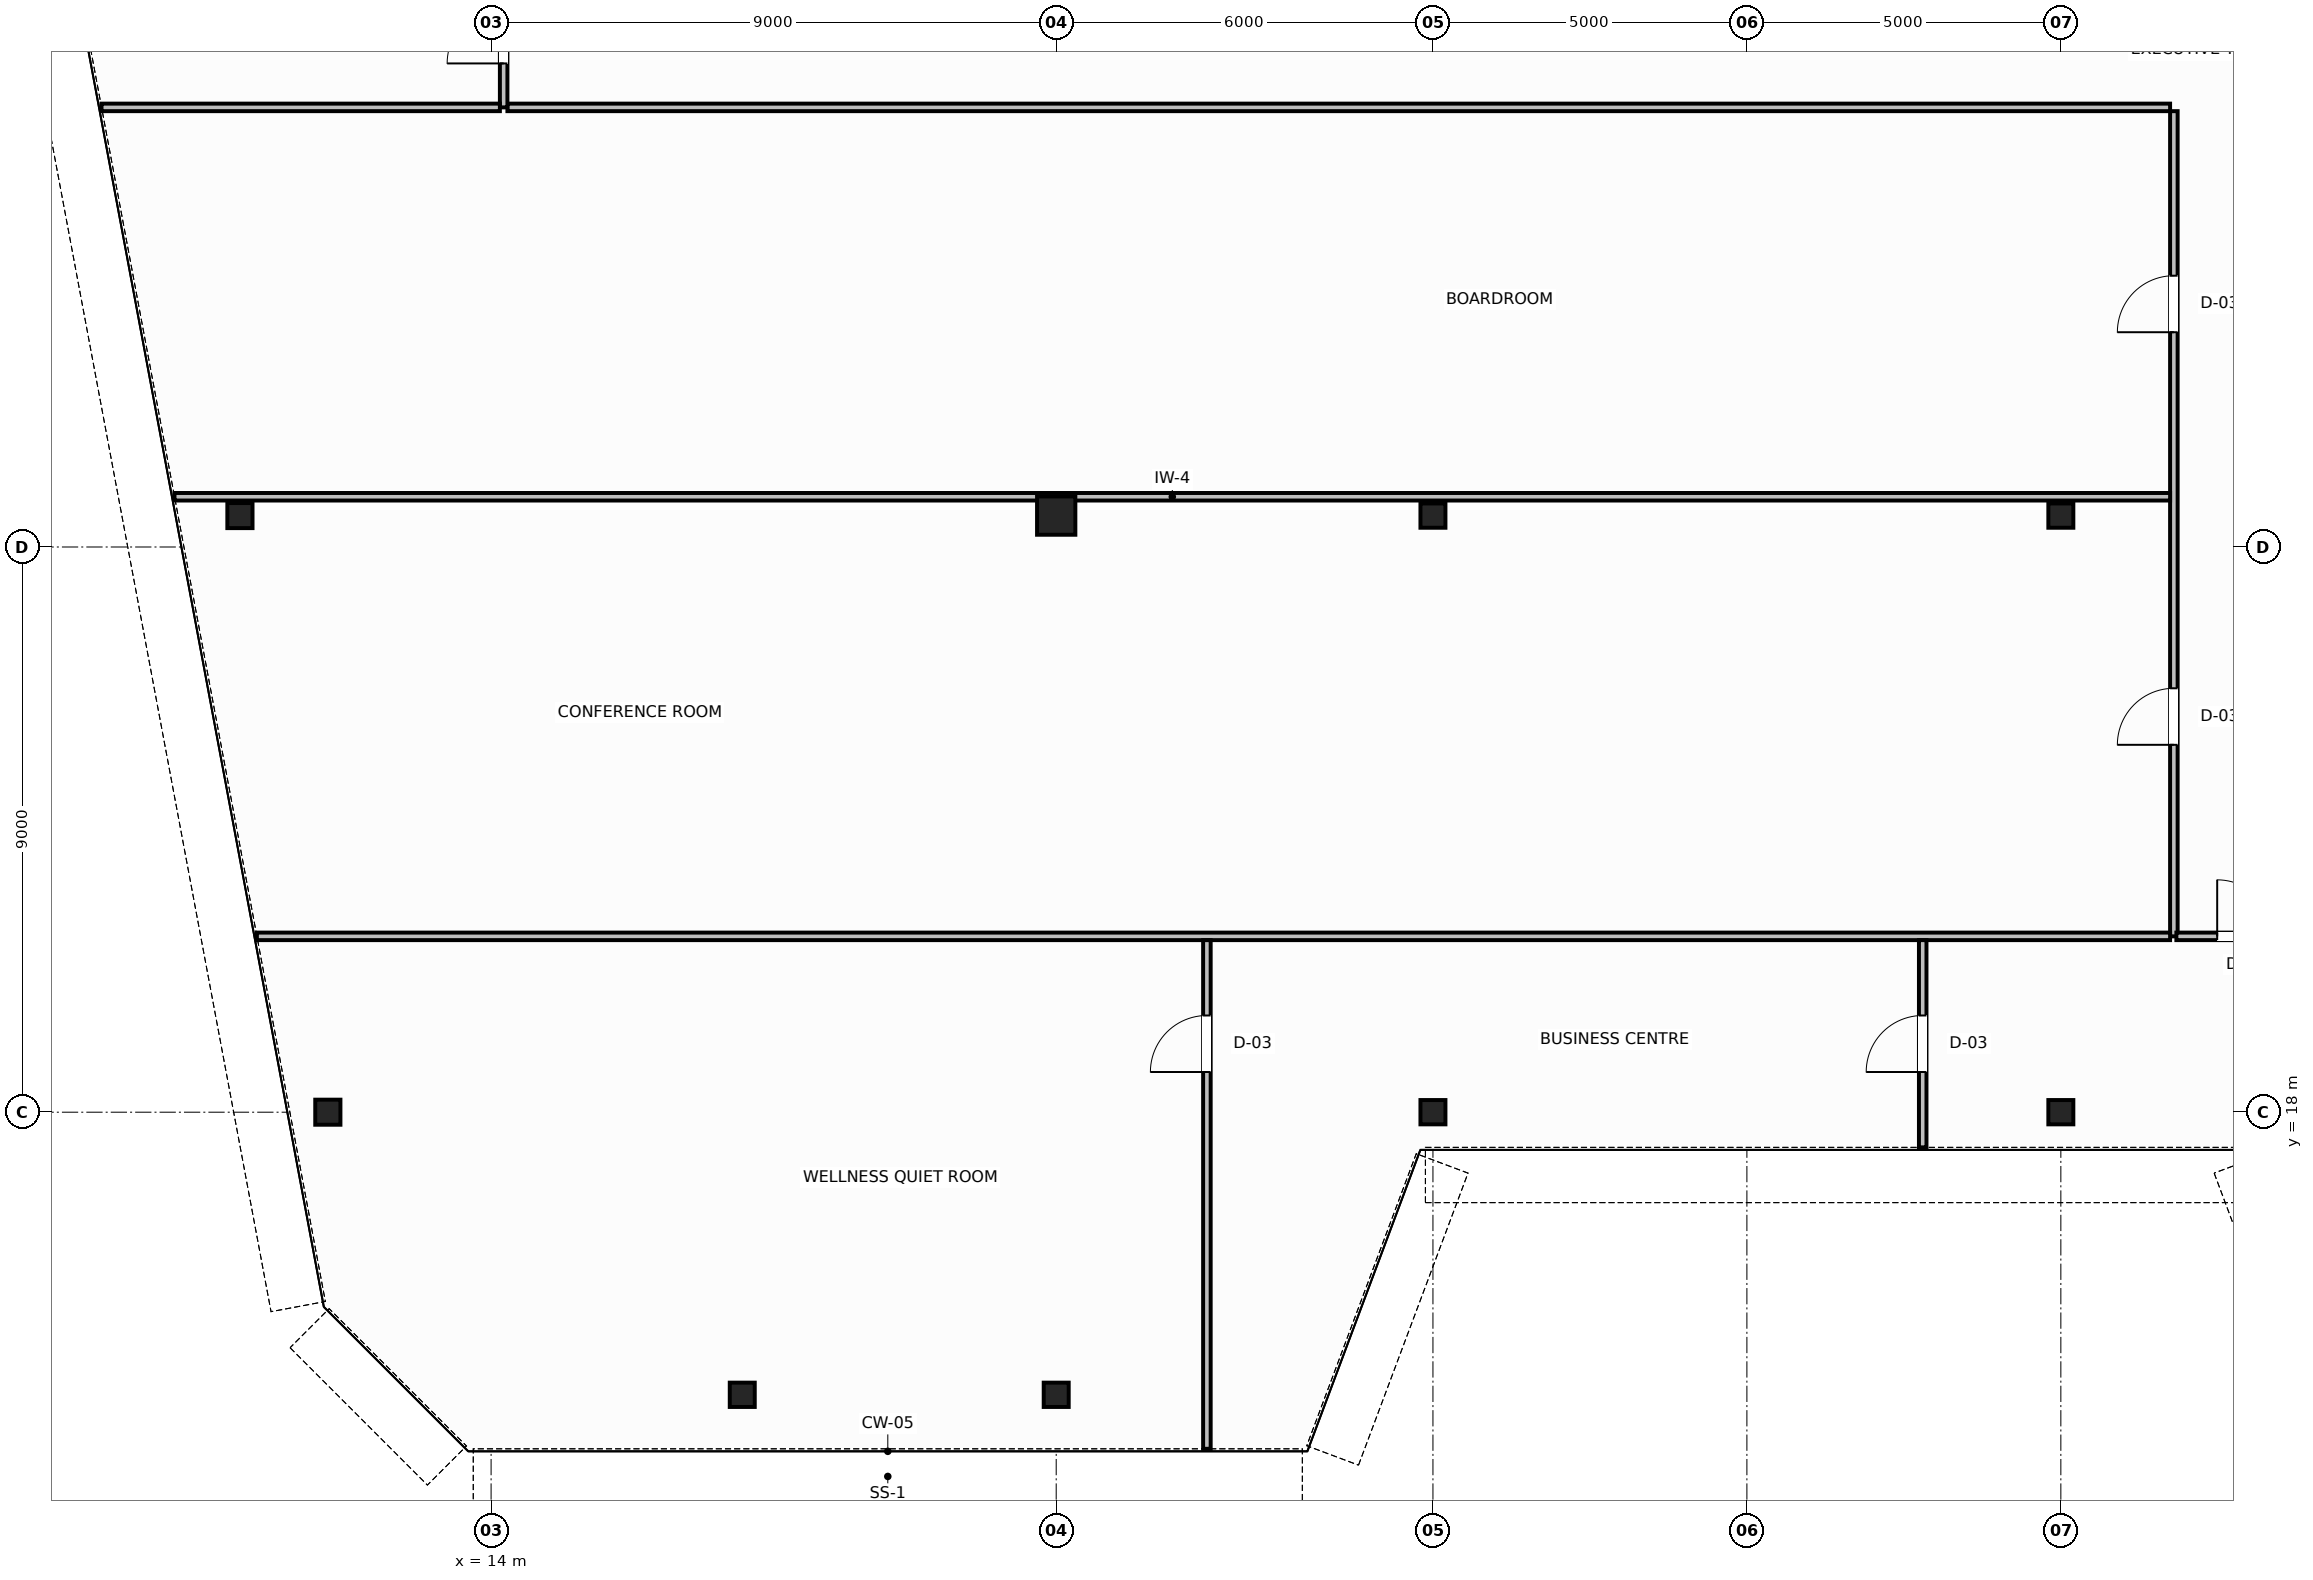
"""IFC4 building model, lengths in metres.
Left out: names, types, materials, properties, quantities, classifications, styles, units other than length and angle.
Written with IfcOpenShell. Run it as: python <this file> out.ifc"""

import sys

from ifc_helpers import new_model, si_unit, direction, frame, frame_2d, origin, origin_2d, place, context, subcontext, project, spatial, rectangle, hollow_circle, i_section, extrude, source, transform, mapped, element, fill, save


model = new_model("IFC4")
c1 = context("Model", 3, precision=1e-05, world=origin(), true_north=direction((0.0, 1.0)))
c2 = subcontext(c1, "Body", "Model", "MODEL_VIEW")
j1 = project(units=[si_unit("LENGTHUNIT", "METRE"), si_unit("PLANEANGLEUNIT", "RADIAN")], contexts=[c1])
p1 = place(None, origin())
s1 = spatial("IfcSite", under=j1, at=p1, CompositionType="ELEMENT")
p2 = place(p1, origin())
s2 = spatial("IfcBuilding", under=s1, at=p2, CompositionType="ELEMENT")
p3 = place(p2, frame((0.0, 0.0, 287.8)))
s3 = spatial("IfcBuildingStorey", under=s2, at=p3, CompositionType="ELEMENT", Elevation=287.8)
m1 = source(origin(), c2, "Body", "SweptSolid", [
    extrude(i_section(OverallWidth=0.401, OverallDepth=0.399, WebThickness=0.025, FlangeThickness=0.035, FilletRadius=0.015, at=origin_2d()), origin(), (0.0, 0.0, 1.0), 3.8),
])
for number, where, z_axis, x_axis in (
    (1, (10.0, 27.5, 0.0), (0.0, 0.0, 1.0), (1.0, 0.0, 0.0)),
    (2, (11.4, 18.0, 0.0), (0.0, 0.0, 1.0), (1.0, 0.0, 0.0)),
):
    element("IfcColumn", number, at=place(p3, frame(where, z_axis=z_axis, x_axis=x_axis)), inside=s3, PredefinedType="COLUMN", context=c2, shape_type="MappedRepresentation", body=[
        mapped(m1, transform((0.0, 0.0, 0.0), scale=1.0)),
    ])
m2 = source(origin(), c2, "Body", "SweptSolid", [
    extrude(hollow_circle(Radius=0.305, WallThickness=0.03, at=origin_2d()), origin(), (0.0, 0.0, 1.0), 3.8),
])
p4 = place(p3, frame((23.0, 27.5, 0.0), z_axis=(0.0, 0.0, 1.0), x_axis=(1.0, 0.0, 0.0)))
e3 = element("IfcColumn", 3, at=p4, inside=s3, PredefinedType="COLUMN", context=c2, shape_type="MappedRepresentation", body=[
    mapped(m2, transform((0.0, 0.0, 0.0), scale=1.0)),
])
m3 = source(origin(), c2, "Body", "SweptSolid", [
    extrude(i_section(OverallWidth=0.398, OverallDepth=0.387, WebThickness=0.021, FlangeThickness=0.029, FilletRadius=0.015, at=origin_2d()), origin(), (0.0, 0.0, 1.0), 3.8),
])
for number, where, z_axis, x_axis in (
    (4, (29.0, 27.5, 0.0), (0.0, 0.0, 1.0), (1.0, 0.0, 0.0)),
    (5, (39.0, 27.5, 0.0), (0.0, 0.0, 1.0), (1.0, 0.0, 0.0)),
    (6, (18.0, 13.5, 0.0), (0.0, 0.0, 1.0), (1.0, 0.0, 0.0)),
    (7, (23.0, 13.5, 0.0), (0.0, 0.0, 1.0), (1.0, 0.0, 0.0)),
    (8, (29.0, 18.0, 0.0), (0.0, 0.0, 1.0), (1.0, 0.0, 0.0)),
    (9, (39.0, 18.0, 0.0), (0.0, 0.0, 1.0), (1.0, 0.0, 0.0)),
):
    element("IfcColumn", number, at=place(p3, frame(where, z_axis=z_axis, x_axis=x_axis)), inside=s3, PredefinedType="COLUMN", context=c2, shape_type="MappedRepresentation", body=[
        mapped(m3, transform((0.0, 0.0, 0.0), scale=1.0)),
    ])
p5 = place(p3, frame((14.26, 34.0, 0.0), z_axis=(0.0, 0.0, 1.0), x_axis=(1.0, 0.0, 0.0)))
e10 = element("IfcWall", 10, at=p5, inside=s3, PredefinedType="PARTITIONING", context=c2, shape_type="SweptSolid", body=[
    extrude(rectangle(XDim=26.48, YDim=0.12, at=frame_2d((13.24, 0.0))), origin(), (0.0, 0.0, 1.0), 3.58),
])
p6 = place(p3, frame((14.2, 34.0, 0.0), z_axis=(0.0, 0.0, 1.0), x_axis=(0.0, 1.0, 0.0)))
e11 = element("IfcWall", 11, at=p6, inside=s3, PredefinedType="PARTITIONING", context=c2, shape_type="SweptSolid", body=[
    extrude(rectangle(XDim=2.44, YDim=0.12, at=frame_2d((1.22, 0.0))), origin(), (0.0, 0.0, 1.0), 3.58),
])
p7 = place(p6, frame((0.7, 0.0, 0.0)))
e12 = element("IfcOpeningElement", 12, at=p7, cuts=e11, PredefinedType="OPENING", context=c2, shape_type="SweptSolid", body=[
    extrude(rectangle(XDim=0.9, YDim=2.15, at=frame_2d((0.45, 1.075))), frame((0.0, 0.07, 0.0), z_axis=(0.0, -1.0, 0.0), x_axis=(1.0, 0.0, 0.0)), (0.0, 0.0, 1.0), 0.14),
])
p8 = place(p3, frame((40.8, 20.8, 0.0), z_axis=(0.0, 0.0, 1.0), x_axis=(0.0, 1.0, 0.0)))
e13 = element("IfcWall", 13, at=p8, inside=s3, PredefinedType="PARTITIONING", context=c2, shape_type="SweptSolid", body=[
    extrude(rectangle(XDim=13.14, YDim=0.12, at=frame_2d((6.57, 0.0))), origin(), (0.0, 0.0, 1.0), 3.58),
])
p9 = place(p8, frame((3.05, 0.0, 0.0)))
e14 = element("IfcOpeningElement", 14, at=p9, cuts=e13, PredefinedType="OPENING", context=c2, shape_type="SweptSolid", body=[
    extrude(rectangle(XDim=0.9, YDim=2.15, at=frame_2d((0.45, 1.075))), frame((0.0, 0.07, 0.0), z_axis=(0.0, -1.0, 0.0), x_axis=(1.0, 0.0, 0.0)), (0.0, 0.0, 1.0), 0.14),
])
p10 = place(p8, frame((9.62, 0.0, 0.0)))
e15 = element("IfcOpeningElement", 15, at=p10, cuts=e13, PredefinedType="OPENING", context=c2, shape_type="SweptSolid", body=[
    extrude(rectangle(XDim=0.9, YDim=2.15, at=frame_2d((0.45, 1.075))), frame((0.0, 0.07, 0.0), z_axis=(0.0, -1.0, 0.0), x_axis=(1.0, 0.0, 0.0)), (0.0, 0.0, 1.0), 0.14),
])
p11 = place(p3, frame((40.84, 20.8, 0.0), z_axis=(0.0, 0.0, 1.0), x_axis=(1.0, 0.0, 0.0)))
e16 = element("IfcWall", 16, at=p11, inside=s3, PredefinedType="PARTITIONING", context=c2, shape_type="SweptSolid", body=[
    extrude(rectangle(XDim=2.32, YDim=0.12, at=frame_2d((1.16, 0.0))), origin(), (0.0, 0.0, 1.0), 3.58),
])
p12 = place(p11, frame((0.65, 0.0, 0.0)))
e17 = element("IfcOpeningElement", 17, at=p12, cuts=e16, PredefinedType="OPENING", context=c2, shape_type="SweptSolid", body=[
    extrude(rectangle(XDim=0.9, YDim=2.15, at=frame_2d((0.45, 1.075))), frame((0.0, 0.07, 0.0), z_axis=(0.0, -1.0, 0.0), x_axis=(1.0, 0.0, 0.0)), (0.0, 0.0, 1.0), 0.14),
])
p13 = place(p3, frame((7.796, 34.0, 0.0), z_axis=(0.0, 0.0, 1.0), x_axis=(1.0, 0.0, 0.0)))
e18 = element("IfcWall", 18, at=p13, inside=s3, PredefinedType="PARTITIONING", context=c2, shape_type="SweptSolid", body=[
    extrude(rectangle(XDim=6.344, YDim=0.12, at=frame_2d((3.172, 0.0))), origin(), (0.0, 0.0, 1.0), 3.58),
])
p14 = place(p3, frame((8.958, 27.8, 0.0), z_axis=(0.0, 0.0, 1.0), x_axis=(1.0, 0.0, 0.0)))
e19 = element("IfcWall", 19, at=p14, inside=s3, PredefinedType="PARTITIONING", context=c2, shape_type="SweptSolid", body=[
    extrude(rectangle(XDim=31.782, YDim=0.12, at=frame_2d((15.891, 0.0))), origin(), (0.0, 0.0, 1.0), 3.58),
])
p15 = place(p3, frame((10.27, 20.8, 0.0), z_axis=(0.0, 0.0, 1.0), x_axis=(1.0, 0.0, 0.0)))
e20 = element("IfcWall", 20, at=p15, inside=s3, PredefinedType="PARTITIONING", context=c2, shape_type="SweptSolid", body=[
    extrude(rectangle(XDim=30.47, YDim=0.12, at=frame_2d((15.235, 0.0))), origin(), (0.0, 0.0, 1.0), 3.58),
])
p16 = place(p3, frame((25.4, 12.64, 0.0), z_axis=(0.0, 0.0, 1.0), x_axis=(0.0, 1.0, 0.0)))
e21 = element("IfcWall", 21, at=p16, inside=s3, PredefinedType="PARTITIONING", context=c2, shape_type="SweptSolid", body=[
    extrude(rectangle(XDim=8.1, YDim=0.12, at=frame_2d((4.05, 0.0))), origin(), (0.0, 0.0, 1.0), 3.58),
])
p17 = place(p16, frame((6.0, 0.0, 0.0)))
e22 = element("IfcOpeningElement", 22, at=p17, cuts=e21, PredefinedType="OPENING", context=c2, shape_type="SweptSolid", body=[
    extrude(rectangle(XDim=0.9, YDim=2.15, at=frame_2d((0.45, 1.075))), frame((0.0, 0.07, 0.0), z_axis=(0.0, -1.0, 0.0), x_axis=(1.0, 0.0, 0.0)), (0.0, 0.0, 1.0), 0.14),
])
p18 = place(p3, frame((36.8, 17.44, 0.0), z_axis=(0.0, 0.0, 1.0), x_axis=(0.0, 1.0, 0.0)))
e23 = element("IfcWall", 23, at=p18, inside=s3, PredefinedType="PARTITIONING", context=c2, shape_type="SweptSolid", body=[
    extrude(rectangle(XDim=3.3, YDim=0.12, at=frame_2d((1.65, 0.0))), origin(), (0.0, 0.0, 1.0), 3.58),
])
p19 = place(p18, frame((1.2, 0.0, 0.0)))
e24 = element("IfcOpeningElement", 24, at=p19, cuts=e23, PredefinedType="OPENING", context=c2, shape_type="SweptSolid", body=[
    extrude(rectangle(XDim=0.9, YDim=2.15, at=frame_2d((0.45, 1.075))), frame((0.0, 0.07, 0.0), z_axis=(0.0, -1.0, 0.0), x_axis=(1.0, 0.0, 0.0)), (0.0, 0.0, 1.0), 0.14),
])
m4 = source(origin(), c2, "Body", "SweptSolid", [
    extrude(rectangle(XDim=0.9, YDim=2.15, at=frame_2d((0.45, 1.075))), frame((0.0, 0.025, 0.0), z_axis=(0.0, -1.0, 0.0), x_axis=(1.0, 0.0, 0.0)), (0.0, 0.0, 1.0), 0.05),
])
p20 = place(p7, origin())
e25 = element("IfcDoor", 25, at=p20, inside=s3, OperationType="SINGLE_SWING_LEFT", PredefinedType="DOOR", context=c2, shape_type="MappedRepresentation", body=[
    mapped(m4, transform((0.0, 0.0, 0.0), scale=1.0)),
])
fill(e12, e25)
p21 = place(p9, origin())
e26 = element("IfcDoor", 26, at=p21, inside=s3, OperationType="SINGLE_SWING_LEFT", PredefinedType="DOOR", context=c2, shape_type="MappedRepresentation", body=[
    mapped(m4, transform((0.0, 0.0, 0.0), scale=1.0)),
])
fill(e14, e26)
p22 = place(p10, origin())
e27 = element("IfcDoor", 27, at=p22, inside=s3, OperationType="SINGLE_SWING_RIGHT", PredefinedType="DOOR", context=c2, shape_type="MappedRepresentation", body=[
    mapped(m4, transform((0.0, 0.0, 0.0), scale=1.0)),
])
fill(e15, e27)
p23 = place(p17, origin())
e28 = element("IfcDoor", 28, at=p23, inside=s3, OperationType="SINGLE_SWING_RIGHT", PredefinedType="DOOR", context=c2, shape_type="MappedRepresentation", body=[
    mapped(m4, transform((0.0, 0.0, 0.0), scale=1.0)),
])
fill(e22, e28)
p24 = place(p19, origin())
e29 = element("IfcDoor", 29, at=p24, inside=s3, OperationType="SINGLE_SWING_LEFT", PredefinedType="DOOR", context=c2, shape_type="MappedRepresentation", body=[
    mapped(m4, transform((0.0, 0.0, 0.0), scale=1.0)),
])
fill(e24, e29)
p25 = place(p12, origin())
e30 = element("IfcDoor", 30, at=p25, inside=s3, OperationType="SINGLE_SWING_LEFT", PredefinedType="DOOR", context=c2, shape_type="MappedRepresentation", body=[
    mapped(m4, transform((0.0, 0.0, 0.0), scale=1.0)),
])
fill(e17, e30)
save(model, sys.argv[1])
